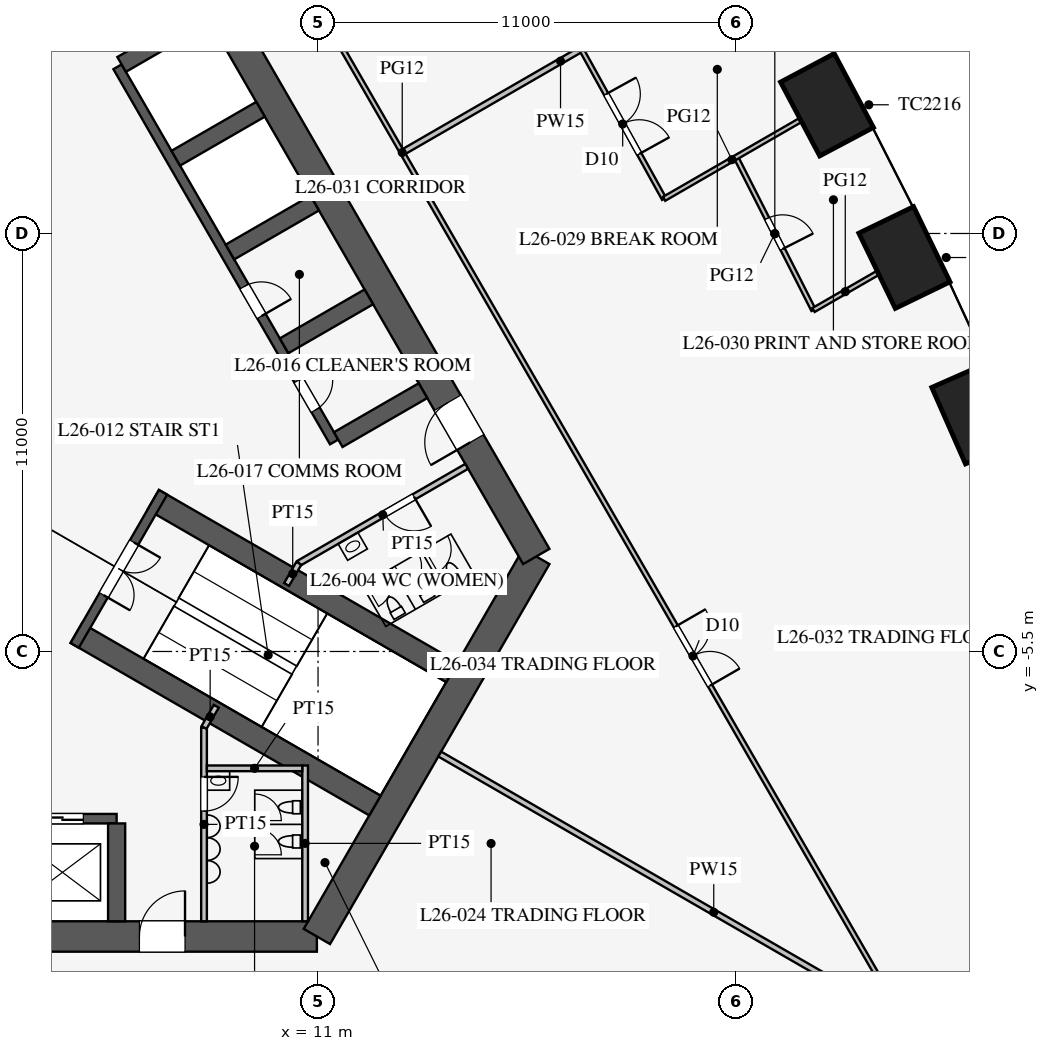
"""IFC4 building model, lengths in metres.
Left out: names, types, materials, properties, quantities, classifications, styles, units other than length and angle.
Written with IfcOpenShell. Run it as: python <this file> out.ifc"""

import sys

from ifc_helpers import new_model, si_unit, direction, frame, frame_2d, origin, origin_2d, place, context, subcontext, project, spatial, rectangle, extrude, element, fill, save


model = new_model("IFC4")
c1 = context("Model", 3, precision=1e-05, world=origin(), true_north=direction((0.0, 1.0)))
c2 = subcontext(c1, "Body", "Model", "MODEL_VIEW")
j1 = project(units=[si_unit("LENGTHUNIT", "METRE"), si_unit("PLANEANGLEUNIT", "RADIAN")], contexts=[c1])
p1 = place(None, origin())
s1 = spatial("IfcSite", under=j1, at=p1, CompositionType="ELEMENT")
p2 = place(p1, origin())
s2 = spatial("IfcBuilding", under=s1, at=p2, CompositionType="ELEMENT")
p3 = place(p2, frame((0.0, 0.0, 115.7)))
s3 = spatial("IfcBuildingStorey", under=s2, at=p3, CompositionType="ELEMENT", Elevation=115.7)
for number, where, z_axis, x_axis in (
    (1, (28.325, 0.765, 0.0), (0.0, 0.0, 1.0), (-0.403, 0.915, 0.0)),
    (2, (26.43, 4.867, 0.0), (0.0, 0.0, 1.0), (-0.436, 0.9, 0.0)),
    (3, (24.393, 8.887, 0.0), (0.0, 0.0, 1.0), (-0.468, 0.883, 0.0)),
):
    element("IfcColumn", number, at=place(p3, frame(where, z_axis=z_axis, x_axis=x_axis)), inside=s3, PredefinedType="COLUMN", context=c2, shape_type="SweptSolid", body=[
        extrude(rectangle(XDim=2.2, YDim=1.6, at=origin_2d()), origin(), (0.0, 0.0, 1.0), 4.2),
    ])
p4 = place(p3, frame((-10.97, -13.0, 0.0), z_axis=(0.0, 0.0, 1.0), x_axis=(1.0, 0.0, 0.0)))
e4 = element("IfcWall", 4, at=p4, inside=s3, PredefinedType="SHEAR", context=c2, shape_type="SweptSolid", body=[
    extrude(rectangle(XDim=21.939, YDim=0.8, at=frame_2d((10.97, 0.0))), origin(), (0.0, 0.0, 1.0), 4.2),
])
p5 = place(p4, frame((17.27, 0.0, 0.0)))
e5 = element("IfcOpeningElement", 5, at=p5, cuts=e4, PredefinedType="OPENING", context=c2, shape_type="SweptSolid", body=[
    extrude(rectangle(XDim=1.2, YDim=2.1, at=frame_2d((0.6, 1.05))), frame((0.0, 0.41, 0.0), z_axis=(0.0, -1.0, 0.0), x_axis=(1.0, 0.0, 0.0)), (0.0, 0.0, 1.0), 0.82),
])
p6 = place(p4, frame((3.47, 0.0, 0.0)))
e6 = element("IfcOpeningElement", 6, at=p6, cuts=e4, PredefinedType="OPENING", context=c2, shape_type="SweptSolid", body=[
    extrude(rectangle(XDim=1.2, YDim=2.1, at=frame_2d((0.6, 1.05))), frame((0.0, 0.41, 0.0), z_axis=(0.0, -1.0, 0.0), x_axis=(1.0, 0.0, 0.0)), (0.0, 0.0, 1.0), 0.82),
])
p7 = place(p3, frame((10.97, -13.0, 0.0), z_axis=(0.0, 0.0, 1.0), x_axis=(0.499995765644, 0.866027848477, 0.0)))
e7 = element("IfcWall", 7, at=p7, inside=s3, PredefinedType="SHEAR", context=c2, shape_type="SweptSolid", body=[
    extrude(rectangle(XDim=11.547, YDim=0.8, at=frame_2d((5.773, 0.0))), origin(), (0.0, 0.0, 1.0), 4.2),
])
p8 = place(p3, frame((16.743, -3.0, 0.0), z_axis=(0.0, 0.0, 1.0), x_axis=(-0.500002442456, 0.866023993627, 0.0)))
e8 = element("IfcWall", 8, at=p8, inside=s3, PredefinedType="SHEAR", context=c2, shape_type="SweptSolid", body=[
    extrude(rectangle(XDim=21.939, YDim=0.8, at=frame_2d((10.97, 0.0))), origin(), (0.0, 0.0, 1.0), 4.2),
])
p9 = place(p8, frame((17.27, 0.0, 0.0)))
e9 = element("IfcOpeningElement", 9, at=p9, cuts=e8, PredefinedType="OPENING", context=c2, shape_type="SweptSolid", body=[
    extrude(rectangle(XDim=1.2, YDim=2.1, at=frame_2d((0.6, 1.05))), frame((0.0, 0.41, 0.0), z_axis=(0.0, -1.0, 0.0), x_axis=(1.0, 0.0, 0.0)), (0.0, 0.0, 1.0), 0.82),
])
p10 = place(p8, frame((3.47, 0.0, 0.0)))
e10 = element("IfcOpeningElement", 10, at=p10, cuts=e8, PredefinedType="OPENING", context=c2, shape_type="SweptSolid", body=[
    extrude(rectangle(XDim=1.2, YDim=2.1, at=frame_2d((0.6, 1.05))), frame((0.0, 0.41, 0.0), z_axis=(0.0, -1.0, 0.0), x_axis=(1.0, 0.0, 0.0)), (0.0, 0.0, 1.0), 0.82),
])
p11 = place(p3, frame((-5.7, -9.9, 0.0), z_axis=(0.0, 0.0, 1.0), x_axis=(1.0, 0.0, 0.0)))
e11 = element("IfcWall", 11, at=p11, inside=s3, PredefinedType="SHEAR", context=c2, shape_type="SweptSolid", body=[
    extrude(rectangle(XDim=11.4, YDim=0.25, at=frame_2d((5.7, 0.0))), origin(), (0.0, 0.0, 1.0), 4.2),
])
p12 = place(p11, frame((0.875, 0.0, 0.0)))
e12 = element("IfcOpeningElement", 12, at=p12, cuts=e11, PredefinedType="OPENING", context=c2, shape_type="SweptSolid", body=[
    extrude(rectangle(XDim=1.1, YDim=2.2, at=frame_2d((0.55, 1.1))), frame((0.0, 0.135, 0.0), z_axis=(0.0, -1.0, 0.0), x_axis=(1.0, 0.0, 0.0)), (0.0, 0.0, 1.0), 0.27),
])
p13 = place(p11, frame((3.725, 0.0, 0.0)))
e13 = element("IfcOpeningElement", 13, at=p13, cuts=e11, PredefinedType="OPENING", context=c2, shape_type="SweptSolid", body=[
    extrude(rectangle(XDim=1.1, YDim=2.2, at=frame_2d((0.55, 1.1))), frame((0.0, 0.135, 0.0), z_axis=(0.0, -1.0, 0.0), x_axis=(1.0, 0.0, 0.0)), (0.0, 0.0, 1.0), 0.27),
])
p14 = place(p11, frame((6.575, 0.0, 0.0)))
e14 = element("IfcOpeningElement", 14, at=p14, cuts=e11, PredefinedType="OPENING", context=c2, shape_type="SweptSolid", body=[
    extrude(rectangle(XDim=1.1, YDim=2.2, at=frame_2d((0.55, 1.1))), frame((0.0, 0.135, 0.0), z_axis=(0.0, -1.0, 0.0), x_axis=(1.0, 0.0, 0.0)), (0.0, 0.0, 1.0), 0.27),
])
p15 = place(p11, frame((9.425, 0.0, 0.0)))
e15 = element("IfcOpeningElement", 15, at=p15, cuts=e11, PredefinedType="OPENING", context=c2, shape_type="SweptSolid", body=[
    extrude(rectangle(XDim=1.1, YDim=2.2, at=frame_2d((0.55, 1.1))), frame((0.0, 0.135, 0.0), z_axis=(0.0, -1.0, 0.0), x_axis=(1.0, 0.0, 0.0)), (0.0, 0.0, 1.0), 0.27),
])
p16 = place(p3, frame((5.7, -10.025, 0.0), z_axis=(0.0, 0.0, 1.0), x_axis=(0.0, -1.0, 0.0)))
e16 = element("IfcWall", 16, at=p16, inside=s3, PredefinedType="SHEAR", context=c2, shape_type="SweptSolid", body=[
    extrude(rectangle(XDim=2.575, YDim=0.45, at=frame_2d((1.288, 0.0))), origin(), (0.0, 0.0, 1.0), 4.2),
])
p17 = place(p3, frame((11.424, 0.014, 0.0), z_axis=(0.0, 0.0, 1.0), x_axis=(-0.500001763848, 0.866024385424, 0.0)))
e17 = element("IfcWall", 17, at=p17, inside=s3, PredefinedType="SHEAR", context=c2, shape_type="SweptSolid", body=[
    extrude(rectangle(XDim=11.4, YDim=0.25, at=frame_2d((5.7, 0.0))), origin(), (0.0, 0.0, 1.0), 4.2),
])
p18 = place(p17, frame((0.975, 0.0, 0.0)))
e18 = element("IfcOpeningElement", 18, at=p18, cuts=e17, PredefinedType="OPENING", context=c2, shape_type="SweptSolid", body=[
    extrude(rectangle(XDim=0.9, YDim=2.1, at=frame_2d((0.45, 1.05))), frame((0.0, 0.135, 0.0), z_axis=(0.0, -1.0, 0.0), x_axis=(1.0, 0.0, 0.0)), (0.0, 0.0, 1.0), 0.27),
])
p19 = place(p17, frame((3.825, 0.0, 0.0)))
e19 = element("IfcOpeningElement", 19, at=p19, cuts=e17, PredefinedType="OPENING", context=c2, shape_type="SweptSolid", body=[
    extrude(rectangle(XDim=0.9, YDim=2.1, at=frame_2d((0.45, 1.05))), frame((0.0, 0.135, 0.0), z_axis=(0.0, -1.0, 0.0), x_axis=(1.0, 0.0, 0.0)), (0.0, 0.0, 1.0), 0.27),
])
for number, where, z_axis, x_axis in (
    (20, (11.532, 0.076, 0.0), (0.0, 0.0, 1.0), (0.866, 0.5, 0.0)),
    (21, (10.107, 2.544, 0.0), (0.0, 0.0, 1.0), (0.866, 0.5, 0.0)),
    (22, (8.682, 5.012, 0.0), (0.0, 0.0, 1.0), (0.866, 0.5, 0.0)),
    (23, (7.257, 7.481, 0.0), (0.0, 0.0, 1.0), (0.866, 0.5, 0.0)),
):
    element("IfcWall", number, at=place(p3, frame(where, z_axis=z_axis, x_axis=x_axis)), inside=s3, PredefinedType="SHEAR", context=c2, shape_type="SweptSolid", body=[
        extrude(rectangle(XDim=2.575, YDim=0.45, at=frame_2d((1.288, 0.0))), origin(), (0.0, 0.0, 1.0), 4.2),
    ])
p20 = place(p3, frame((5.832, 9.949, 0.0), z_axis=(0.0, 0.0, 1.0), x_axis=(0.866029291668, 0.499993265928, 0.0)))
e24 = element("IfcWall", 24, at=p20, inside=s3, PredefinedType="SHEAR", context=c2, shape_type="SweptSolid", body=[
    extrude(rectangle(XDim=2.575, YDim=0.45, at=frame_2d((1.288, 0.0))), origin(), (0.0, 0.0, 1.0), 4.2),
])
for number, where, z_axis, x_axis in (
    (25, (4.638, -5.016, 0.0), (0.0, 0.0, 1.0), (0.866, -0.5, 0.0)),
    (26, (6.663, -1.509, 0.0), (0.0, 0.0, 1.0), (0.866, -0.5, 0.0)),
):
    element("IfcWall", number, at=place(p3, frame(where, z_axis=z_axis, x_axis=x_axis)), inside=s3, PredefinedType="SHEAR", context=c2, shape_type="SweptSolid", body=[
        extrude(rectangle(XDim=9.075, YDim=0.6, at=frame_2d((4.538, 0.0))), origin(), (0.0, 0.0, 1.0), 4.2),
    ])
p21 = place(p3, frame((4.597, -5.339, 0.0), z_axis=(0.0, 0.0, 1.0), x_axis=(0.499984536904, 0.866034331223, 0.0)))
e27 = element("IfcWall", 27, at=p21, inside=s3, PredefinedType="SHEAR", context=c2, shape_type="SweptSolid", body=[
    extrude(rectangle(XDim=4.65, YDim=0.25, at=frame_2d((2.325, 0.0))), origin(), (0.0, 0.0, 1.0), 4.2),
])
p22 = place(p21, frame((1.525, 0.0, 0.0)))
e28 = element("IfcOpeningElement", 28, at=p22, cuts=e27, PredefinedType="OPENING", context=c2, shape_type="SweptSolid", body=[
    extrude(rectangle(XDim=1.6, YDim=2.1, at=frame_2d((0.8, 1.05))), frame((0.0, 0.135, 0.0), z_axis=(0.0, -1.0, 0.0), x_axis=(1.0, 0.0, 0.0)), (0.0, 0.0, 1.0), 0.27),
])
p23 = place(p3, frame((8.0, -7.5, 0.0), z_axis=(0.0, 0.0, 1.0), x_axis=(0.0, -1.0, 0.0)))
e29 = element("IfcWall", 29, at=p23, inside=s3, PredefinedType="PARTITIONING", context=c2, shape_type="SweptSolid", body=[
    extrude(rectangle(XDim=5.1, YDim=0.15, at=frame_2d((2.55, 0.0))), origin(), (0.0, 0.0, 1.0), 4.0),
])
p24 = place(p23, frame((1.3, 0.0, 0.0)))
e30 = element("IfcOpeningElement", 30, at=p24, cuts=e29, PredefinedType="OPENING", context=c2, shape_type="SweptSolid", body=[
    extrude(rectangle(XDim=0.9, YDim=2.1, at=frame_2d((0.45, 1.05))), frame((0.0, 0.085, 0.0), z_axis=(0.0, -1.0, 0.0), x_axis=(1.0, 0.0, 0.0)), (0.0, 0.0, 1.0), 0.17),
])
p25 = place(p3, frame((10.495, -3.178, 0.0), z_axis=(0.0, 0.0, 1.0), x_axis=(0.86602216432, 0.500005610874, 0.0)))
e31 = element("IfcWall", 31, at=p25, inside=s3, PredefinedType="PARTITIONING", context=c2, shape_type="SweptSolid", body=[
    extrude(rectangle(XDim=5.1, YDim=0.15, at=frame_2d((2.55, 0.0))), origin(), (0.0, 0.0, 1.0), 4.0),
])
p26 = place(p25, frame((2.6, 0.0, 0.0)))
e32 = element("IfcOpeningElement", 32, at=p26, cuts=e31, PredefinedType="OPENING", context=c2, shape_type="SweptSolid", body=[
    extrude(rectangle(XDim=0.9, YDim=2.1, at=frame_2d((0.45, 1.05))), frame((0.0, 0.085, 0.0), z_axis=(0.0, -1.0, 0.0), x_axis=(1.0, 0.0, 0.0)), (0.0, 0.0, 1.0), 0.17),
])
for number, where, z_axis, x_axis in (
    (33, (8.0, -7.5, 0.0), (0.0, 0.0, 1.0), (0.5, 0.866, 0.0)),
    (34, (10.495, -3.178, 0.0), (0.0, 0.0, 1.0), (-0.5, -0.866, 0.0)),
):
    element("IfcWall", number, at=place(p3, frame(where, z_axis=z_axis, x_axis=x_axis)), inside=s3, PredefinedType="PARTITIONING", context=c2, shape_type="SweptSolid", body=[
        extrude(rectangle(XDim=0.645, YDim=0.15, at=frame_2d((0.323, 0.0))), origin(), (0.0, 0.0, 1.0), 4.0),
    ])
p27 = place(p3, frame((10.66, -8.5, 0.0), z_axis=(0.0, 0.0, 1.0), x_axis=(0.0, -1.0, 0.0)))
e35 = element("IfcWall", 35, at=p27, inside=s3, PredefinedType="PARTITIONING", context=c2, shape_type="SweptSolid", body=[
    extrude(rectangle(XDim=4.1, YDim=0.15, at=frame_2d((2.05, 0.0))), origin(), (0.0, 0.0, 1.0), 4.0),
])
p28 = place(p3, frame((8.075, -8.575, 0.0), z_axis=(0.0, 0.0, 1.0), x_axis=(1.0, 0.0, 0.0)))
e36 = element("IfcWall", 36, at=p28, inside=s3, PredefinedType="PARTITIONING", context=c2, shape_type="SweptSolid", body=[
    extrude(rectangle(XDim=2.51, YDim=0.15, at=frame_2d((1.255, 0.0))), origin(), (0.0, 0.0, 1.0), 4.0),
])
p29 = place(p3, frame((14.203, -8.2, 0.0), z_axis=(0.0, 0.0, 1.0), x_axis=(0.866024668836, -0.500001272966, 0.0)))
e37 = element("IfcWall", 37, at=p29, inside=s3, PredefinedType="PARTITIONING", context=c2, shape_type="SweptSolid", body=[
    extrude(rectangle(XDim=16.65, YDim=0.15, at=frame_2d((8.325, 0.0))), origin(), (0.0, 0.0, 1.0), 2.3),
])
p30 = place(p3, frame((13.268, 7.66, 0.0), z_axis=(0.0, 0.0, 1.0), x_axis=(0.866013963754, 0.500019814191, 0.0)))
e38 = element("IfcWall", 38, at=p30, inside=s3, PredefinedType="PARTITIONING", context=c2, shape_type="SweptSolid", body=[
    extrude(rectangle(XDim=9.5, YDim=0.15, at=frame_2d((4.75, 0.0))), origin(), (0.0, 0.0, 1.0), 3.2),
])
p31 = place(p3, frame((26.415, -15.231, 0.0), z_axis=(0.0, 0.0, 1.0), x_axis=(-0.50000091641, 0.866024874695, 0.0)))
e39 = element("IfcWall", 39, at=p31, inside=s3, PredefinedType="PARTITIONING", context=c2, shape_type="SweptSolid", body=[
    extrude(rectangle(XDim=52.796, YDim=0.12, at=frame_2d((26.398, 0.0))), origin(), (0.0, 0.0, 1.0), 2.9),
])
p32 = place(p31, frame((10.2, 0.0, 0.15)))
e40 = element("IfcOpeningElement", 40, at=p32, cuts=e39, PredefinedType="OPENING", context=c2, shape_type="SweptSolid", body=[
    extrude(rectangle(XDim=1.8, YDim=2.1, at=frame_2d((0.9, 1.05))), frame((0.0, 0.07, 0.0), z_axis=(0.0, -1.0, 0.0), x_axis=(1.0, 0.0, 0.0)), (0.0, 0.0, 1.0), 0.14),
])
p33 = place(p31, frame((40.8, 0.0, 0.15)))
e41 = element("IfcOpeningElement", 41, at=p33, cuts=e39, PredefinedType="OPENING", context=c2, shape_type="SweptSolid", body=[
    extrude(rectangle(XDim=1.8, YDim=2.1, at=frame_2d((0.9, 1.05))), frame((0.0, 0.07, 0.0), z_axis=(0.0, -1.0, 0.0), x_axis=(1.0, 0.0, 0.0)), (0.0, 0.0, 1.0), 0.14),
])
p34 = place(p3, frame((20.106, 6.412, 0.0), z_axis=(0.0, 0.0, 1.0), x_axis=(-0.484292898211, 0.874905931368, 0.0)))
e42 = element("IfcWall", 42, at=p34, inside=s3, PredefinedType="PARTITIONING", context=c2, shape_type="SweptSolid", body=[
    extrude(rectangle(XDim=4.501, YDim=0.12, at=frame_2d((2.25, 0.0))), origin(), (0.0, 0.0, 1.0), 2.9),
])
p35 = place(p34, frame((1.35, 0.0, 0.15)))
e43 = element("IfcOpeningElement", 43, at=p35, cuts=e42, PredefinedType="OPENING", context=c2, shape_type="SweptSolid", body=[
    extrude(rectangle(XDim=1.8, YDim=2.1, at=frame_2d((0.9, 1.05))), frame((0.0, 0.07, 0.0), z_axis=(0.0, -1.0, 0.0), x_axis=(1.0, 0.0, 0.0)), (0.0, 0.0, 1.0), 0.14),
])
p36 = place(p3, frame((24.037, 3.486, 0.0), z_axis=(0.0, 0.0, 1.0), x_axis=(-0.452428593635, 0.891800632239, 0.0)))
e44 = element("IfcWall", 44, at=p36, inside=s3, PredefinedType="PARTITIONING", context=c2, shape_type="SweptSolid", body=[
    extrude(rectangle(XDim=4.506, YDim=0.12, at=frame_2d((2.253, 0.0))), origin(), (0.0, 0.0, 1.0), 2.9),
])
p37 = place(p36, frame((1.8, 0.0, 0.15)))
e45 = element("IfcOpeningElement", 45, at=p37, cuts=e44, PredefinedType="OPENING", context=c2, shape_type="SweptSolid", body=[
    extrude(rectangle(XDim=0.9, YDim=2.1, at=frame_2d((0.45, 1.05))), frame((0.0, 0.07, 0.0), z_axis=(0.0, -1.0, 0.0), x_axis=(1.0, 0.0, 0.0)), (0.0, 0.0, 1.0), 0.14),
])
p38 = place(p3, frame((20.106, 6.412, 0.0), z_axis=(0.0, 0.0, 1.0), x_axis=(0.866016800201, 0.500014901547, 0.0)))
e46 = element("IfcWall", 46, at=p38, inside=s3, PredefinedType="PARTITIONING", context=c2, shape_type="SweptSolid", body=[
    extrude(rectangle(XDim=4.119, YDim=0.12, at=frame_2d((2.06, 0.0))), origin(), (0.0, 0.0, 1.0), 2.9),
])
p39 = place(p3, frame((24.037, 3.486, 0.0), z_axis=(0.0, 0.0, 1.0), x_axis=(0.866040295995, 0.499974205047, 0.0)))
e47 = element("IfcWall", 47, at=p39, inside=s3, PredefinedType="PARTITIONING", context=c2, shape_type="SweptSolid", body=[
    extrude(rectangle(XDim=1.931, YDim=0.12, at=frame_2d((0.965, 0.0))), origin(), (0.0, 0.0, 1.0), 2.9),
])
p40 = place(p24, origin())
e48 = element("IfcDoor", 48, at=p40, inside=s3, OperationType="SINGLE_SWING_LEFT", PredefinedType="DOOR", context=c2, shape_type="SweptSolid", body=[
    extrude(rectangle(XDim=0.9, YDim=2.1, at=frame_2d((0.45, 1.05))), frame((0.0, 0.025, 0.0), z_axis=(0.0, -1.0, 0.0), x_axis=(1.0, 0.0, 0.0)), (0.0, 0.0, 1.0), 0.05),
])
fill(e30, e48)
p41 = place(p26, frame((0.9, 0.0, 0.0), z_axis=(0.0, 0.0, 1.0), x_axis=(-1.0, 0.0, 0.0)))
e49 = element("IfcDoor", 49, at=p41, inside=s3, OperationType="SINGLE_SWING_LEFT", PredefinedType="DOOR", context=c2, shape_type="SweptSolid", body=[
    extrude(rectangle(XDim=0.9, YDim=2.1, at=frame_2d((0.45, 1.05))), frame((0.0, 0.025, 0.0), z_axis=(0.0, -1.0, 0.0), x_axis=(1.0, 0.0, 0.0)), (0.0, 0.0, 1.0), 0.05),
])
fill(e32, e49)
p42 = place(p22, frame((1.6, 0.0, 0.0), z_axis=(0.0, 0.0, 1.0), x_axis=(-1.0, 0.0, 0.0)))
e50 = element("IfcDoor", 50, at=p42, inside=s3, OperationType="DOUBLE_DOOR_SINGLE_SWING", PredefinedType="DOOR", context=c2, shape_type="SweptSolid", body=[
    extrude(rectangle(XDim=1.6, YDim=2.1, at=frame_2d((0.8, 1.05))), frame((0.0, 0.025, 0.0), z_axis=(0.0, -1.0, 0.0), x_axis=(1.0, 0.0, 0.0)), (0.0, 0.0, 1.0), 0.05),
])
fill(e28, e50)
p43 = place(p5, origin())
e51 = element("IfcDoor", 51, at=p43, inside=s3, OperationType="SINGLE_SWING_RIGHT", PredefinedType="DOOR", context=c2, shape_type="SweptSolid", body=[
    extrude(rectangle(XDim=1.2, YDim=2.1, at=frame_2d((0.6, 1.05))), frame((0.0, 0.025, 0.0), z_axis=(0.0, -1.0, 0.0), x_axis=(1.0, 0.0, 0.0)), (0.0, 0.0, 1.0), 0.05),
])
fill(e5, e51)
p44 = place(p10, origin())
e52 = element("IfcDoor", 52, at=p44, inside=s3, OperationType="SINGLE_SWING_LEFT", PredefinedType="DOOR", context=c2, shape_type="SweptSolid", body=[
    extrude(rectangle(XDim=1.2, YDim=2.1, at=frame_2d((0.6, 1.05))), frame((0.0, 0.025, 0.0), z_axis=(0.0, -1.0, 0.0), x_axis=(1.0, 0.0, 0.0)), (0.0, 0.0, 1.0), 0.05),
])
fill(e10, e52)
p45 = place(p18, frame((0.9, 0.0, 0.0), z_axis=(0.0, 0.0, 1.0), x_axis=(-1.0, 0.0, 0.0)))
e53 = element("IfcDoor", 53, at=p45, inside=s3, OperationType="SINGLE_SWING_LEFT", PredefinedType="DOOR", context=c2, shape_type="SweptSolid", body=[
    extrude(rectangle(XDim=0.9, YDim=2.1, at=frame_2d((0.45, 1.05))), frame((0.0, 0.025, 0.0), z_axis=(0.0, -1.0, 0.0), x_axis=(1.0, 0.0, 0.0)), (0.0, 0.0, 1.0), 0.05),
])
fill(e18, e53)
p46 = place(p19, frame((0.9, 0.0, 0.0), z_axis=(0.0, 0.0, 1.0), x_axis=(-1.0, 0.0, 0.0)))
e54 = element("IfcDoor", 54, at=p46, inside=s3, OperationType="SINGLE_SWING_RIGHT", PredefinedType="DOOR", context=c2, shape_type="SweptSolid", body=[
    extrude(rectangle(XDim=0.9, YDim=2.1, at=frame_2d((0.45, 1.05))), frame((0.0, 0.025, 0.0), z_axis=(0.0, -1.0, 0.0), x_axis=(1.0, 0.0, 0.0)), (0.0, 0.0, 1.0), 0.05),
])
fill(e19, e54)
p47 = place(p35, frame((1.8, 0.0, 0.0), z_axis=(0.0, 0.0, 1.0), x_axis=(-1.0, 0.0, 0.0)))
e55 = element("IfcDoor", 55, at=p47, inside=s3, OperationType="DOUBLE_DOOR_SINGLE_SWING", PredefinedType="DOOR", context=c2, shape_type="SweptSolid", body=[
    extrude(rectangle(XDim=1.8, YDim=2.1, at=frame_2d((0.9, 1.05))), frame((0.0, 0.025, 0.0), z_axis=(0.0, -1.0, 0.0), x_axis=(1.0, 0.0, 0.0)), (0.0, 0.0, 1.0), 0.05),
])
fill(e43, e55)
p48 = place(p37, frame((0.9, 0.0, 0.0), z_axis=(0.0, 0.0, 1.0), x_axis=(-1.0, 0.0, 0.0)))
e56 = element("IfcDoor", 56, at=p48, inside=s3, OperationType="SINGLE_SWING_RIGHT", PredefinedType="DOOR", context=c2, shape_type="SweptSolid", body=[
    extrude(rectangle(XDim=0.9, YDim=2.1, at=frame_2d((0.45, 1.05))), frame((0.0, 0.025, 0.0), z_axis=(0.0, -1.0, 0.0), x_axis=(1.0, 0.0, 0.0)), (0.0, 0.0, 1.0), 0.05),
])
fill(e45, e56)
p49 = place(p32, frame((1.8, 0.0, 0.0), z_axis=(0.0, 0.0, 1.0), x_axis=(-1.0, 0.0, 0.0)))
e57 = element("IfcDoor", 57, at=p49, inside=s3, OperationType="DOUBLE_DOOR_SINGLE_SWING", PredefinedType="DOOR", context=c2, shape_type="SweptSolid", body=[
    extrude(rectangle(XDim=1.8, YDim=2.1, at=frame_2d((0.9, 1.05))), frame((0.0, 0.025, 0.0), z_axis=(0.0, -1.0, 0.0), x_axis=(1.0, 0.0, 0.0)), (0.0, 0.0, 1.0), 0.05),
])
fill(e40, e57)
p50 = place(p15, origin())
e58 = element("IfcDoor", 58, at=p50, inside=s3, OperationType="DOUBLE_DOOR_SLIDING", PredefinedType="DOOR", context=c2, shape_type="SweptSolid", body=[
    extrude(rectangle(XDim=1.1, YDim=2.2, at=frame_2d((0.55, 1.1))), frame((0.0, 0.025, 0.0), z_axis=(0.0, -1.0, 0.0), x_axis=(1.0, 0.0, 0.0)), (0.0, 0.0, 1.0), 0.05),
])
fill(e15, e58)
save(model, sys.argv[1])
